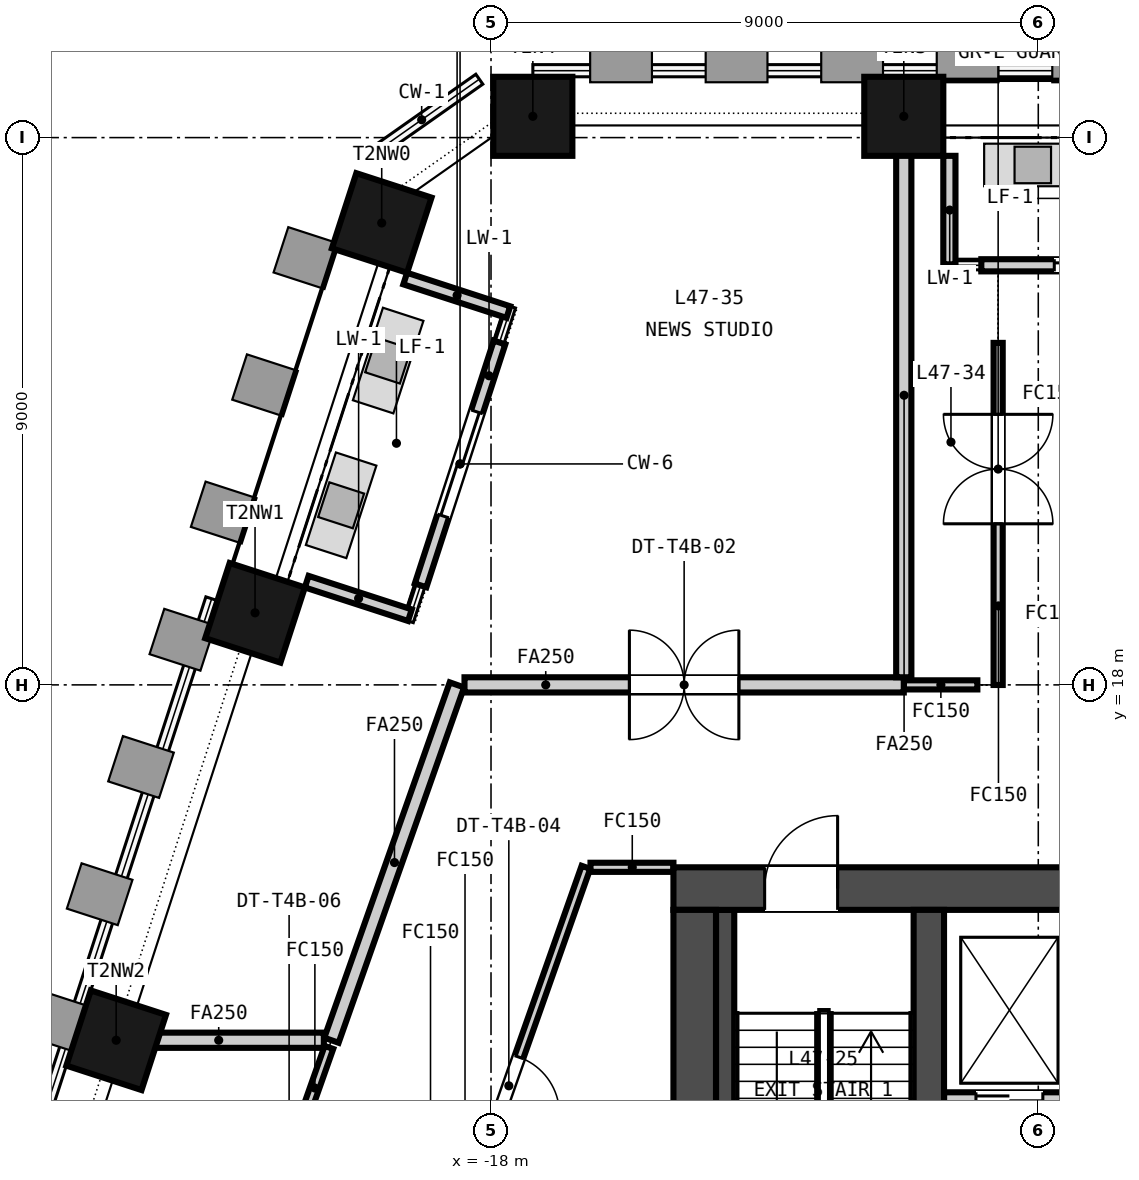
"""IFC4 building model, lengths in metres.
Left out: names, types, materials, properties, quantities, classifications, styles, units other than length and angle.
Written with IfcOpenShell. Run it as: python <this file> out.ifc"""

import sys

from ifc_helpers import new_model, si_unit, direction, frame, frame_2d, origin, origin_2d, place, context, subcontext, project, spatial, rectangle, extrude, element, fill, save


model = new_model("IFC4")
c1 = context("Model", 3, precision=1e-05, world=origin(), true_north=direction((0.0, 1.0)))
c2 = subcontext(c1, "Body", "Model", "MODEL_VIEW")
j1 = project(units=[si_unit("LENGTHUNIT", "METRE"), si_unit("PLANEANGLEUNIT", "RADIAN")], contexts=[c1])
p1 = place(None, origin())
s1 = spatial("IfcSite", under=j1, at=p1, CompositionType="ELEMENT")
p2 = place(p1, origin())
s2 = spatial("IfcBuilding", under=s1, at=p2, CompositionType="ELEMENT")
p3 = place(p2, frame((0.0, 0.0, 189.05)))
s3 = spatial("IfcBuildingStorey", under=s2, at=p3, CompositionType="ELEMENT", Elevation=189.05)
p4 = place(p3, frame((-15.0, 14.65, -0.15), z_axis=(0.0, 0.0, 1.0), x_axis=(1.0, 0.0, 0.0)))
e1 = element("IfcWall", 1, at=p4, inside=s3, PredefinedType="SOLIDWALL", context=c2, shape_type="SweptSolid", body=[
    extrude(rectangle(XDim=30.0, YDim=0.7, at=frame_2d((15.0, 0.0))), origin(), (0.0, 0.0, 1.0), 3.65),
])
p5 = place(p4, frame((9.25, 0.0, 0.15)))
e2 = element("IfcOpeningElement", 2, at=p5, cuts=e1, PredefinedType="OPENING", context=c2, shape_type="SweptSolid", body=[
    extrude(rectangle(XDim=1.5, YDim=2.1, at=frame_2d((0.75, 1.05))), frame((0.0, 0.36, 0.0), z_axis=(0.0, -1.0, 0.0), x_axis=(1.0, 0.0, 0.0)), (0.0, 0.0, 1.0), 0.72),
])
p6 = place(p4, frame((19.4, 0.0, 0.15)))
e3 = element("IfcOpeningElement", 3, at=p6, cuts=e1, PredefinedType="OPENING", context=c2, shape_type="SweptSolid", body=[
    extrude(rectangle(XDim=1.5, YDim=2.1, at=frame_2d((0.75, 1.05))), frame((0.0, 0.36, 0.0), z_axis=(0.0, -1.0, 0.0), x_axis=(1.0, 0.0, 0.0)), (0.0, 0.0, 1.0), 0.72),
])
p7 = place(p4, frame((1.5, 0.0, 0.15)))
e4 = element("IfcOpeningElement", 4, at=p7, cuts=e1, PredefinedType="OPENING", context=c2, shape_type="SweptSolid", body=[
    extrude(rectangle(XDim=1.2, YDim=2.1, at=frame_2d((0.6, 1.05))), frame((0.0, 0.36, 0.0), z_axis=(0.0, -1.0, 0.0), x_axis=(1.0, 0.0, 0.0)), (0.0, 0.0, 1.0), 0.72),
])
p8 = place(p4, frame((27.3, 0.0, 0.15)))
e5 = element("IfcOpeningElement", 5, at=p8, cuts=e1, PredefinedType="OPENING", context=c2, shape_type="SweptSolid", body=[
    extrude(rectangle(XDim=1.2, YDim=2.1, at=frame_2d((0.6, 1.05))), frame((0.0, 0.36, 0.0), z_axis=(0.0, -1.0, 0.0), x_axis=(1.0, 0.0, 0.0)), (0.0, 0.0, 1.0), 0.72),
])
p9 = place(p3, frame((-14.65, 0.7, -0.15), z_axis=(0.0, 0.0, 1.0), x_axis=(0.0, 1.0, 0.0)))
e6 = element("IfcWall", 6, at=p9, inside=s3, PredefinedType="SOLIDWALL", context=c2, shape_type="SweptSolid", body=[
    extrude(rectangle(XDim=13.6, YDim=0.7, at=frame_2d((6.8, 0.0))), origin(), (0.0, 0.0, 1.0), 3.65),
])
p10 = place(p3, frame((-10.8, 0.7, -0.15), z_axis=(0.0, 0.0, 1.0), x_axis=(0.0, 1.0, 0.0)))
e7 = element("IfcWall", 7, at=p10, inside=s3, PredefinedType="SOLIDWALL", context=c2, shape_type="SweptSolid", body=[
    extrude(rectangle(XDim=13.6, YDim=0.5, at=frame_2d((6.8, 0.0))), origin(), (0.0, 0.0, 1.0), 3.65),
])
for number, where, z_axis, x_axis in (
    (8, (-11.212, 27.35, -0.15), (0.0, 0.0, 1.0), (-1.0, 0.0, 0.0)),
    (9, (-17.312, 27.35, -0.15), (0.0, 0.0, 1.0), (-1.0, 0.0, 0.0)),
    (10, (-19.798, 25.596, -0.15), (0.0, 0.0, 1.0), (-0.309, -0.951, 0.0)),
    (11, (-21.881, 19.185, -0.15), (0.0, 0.0, 1.0), (-0.309, -0.951, 0.0)),
    (12, (-24.164, 12.156, -0.15), (0.0, 0.0, 1.0), (-0.309, -0.951, 0.0)),
):
    element("IfcColumn", number, at=place(p3, frame(where, z_axis=z_axis, x_axis=x_axis)), inside=s3, PredefinedType="COLUMN", context=c2, shape_type="SweptSolid", body=[
        extrude(rectangle(XDim=1.3, YDim=1.3, at=origin_2d()), origin(), (0.0, 0.0, 1.0), 3.65),
    ])
p11 = place(p3, frame((-5.737, 24.9, 0.0), z_axis=(0.0, 0.0, 1.0), x_axis=(-1.0, 0.0, 0.0)))
e13 = element("IfcWall", 13, at=p11, inside=s3, PredefinedType="SOLIDWALL", context=c2, shape_type="SweptSolid", body=[
    extrude(rectangle(XDim=4.2, YDim=0.2, at=frame_2d((2.1, 0.0))), origin(), (0.0, 0.0, 1.0), 2.751),
])
p12 = place(p11, frame((1.2, 0.0, 0.0)))
e14 = element("IfcOpeningElement", 14, at=p12, cuts=e13, PredefinedType="OPENING", context=c2, shape_type="SweptSolid", body=[
    extrude(rectangle(XDim=1.8, YDim=2.4, at=frame_2d((0.9, 1.2))), frame((0.0, 0.11, 0.0), z_axis=(0.0, -1.0, 0.0), x_axis=(1.0, 0.0, 0.0)), (0.0, 0.0, 1.0), 0.22),
])
p13 = place(p3, frame((-10.462, 26.7, 0.0), z_axis=(0.0, 0.0, 1.0), x_axis=(0.0, -1.0, 0.0)))
e15 = element("IfcWall", 15, at=p13, inside=s3, PredefinedType="SOLIDWALL", context=c2, shape_type="SweptSolid", body=[
    extrude(rectangle(XDim=1.784, YDim=0.2, at=frame_2d((0.892, 0.0))), origin(), (0.0, 0.0, 1.0), 3.05),
])
p14 = place(p3, frame((-17.86, 23.631, 0.0), z_axis=(0.0, 0.0, 1.0), x_axis=(-0.30901640812, -0.951056706781, 0.0)))
e16 = element("IfcWall", 16, at=p14, inside=s3, PredefinedType="SOLIDWALL", context=c2, shape_type="SweptSolid", body=[
    extrude(rectangle(XDim=4.2, YDim=0.2, at=frame_2d((2.1, 0.0))), origin(), (0.0, 0.0, 1.0), 3.05),
])
p15 = place(p14, frame((1.2, 0.0, 0.0)))
e17 = element("IfcOpeningElement", 17, at=p15, cuts=e16, PredefinedType="OPENING", context=c2, shape_type="SweptSolid", body=[
    extrude(rectangle(XDim=1.8, YDim=2.4, at=frame_2d((0.9, 1.2))), frame((0.0, 0.11, 0.0), z_axis=(0.0, -1.0, 0.0), x_axis=(1.0, 0.0, 0.0)), (0.0, 0.0, 1.0), 0.22),
])
p16 = place(p3, frame((-19.411, 24.682, 0.0), z_axis=(0.0, 0.0, 1.0), x_axis=(0.951064233263, -0.30899324298, 0.0)))
e18 = element("IfcWall", 18, at=p16, inside=s3, PredefinedType="SOLIDWALL", context=c2, shape_type="SweptSolid", body=[
    extrude(rectangle(XDim=1.784, YDim=0.2, at=frame_2d((0.892, 0.0))), origin(), (0.0, 0.0, 1.0), 3.05),
])
p17 = place(p3, frame((-21.031, 19.698, 0.0), z_axis=(0.0, 0.0, 1.0), x_axis=(0.951051165303, -0.309033462549, 0.0)))
e19 = element("IfcWall", 19, at=p17, inside=s3, PredefinedType="SOLIDWALL", context=c2, shape_type="SweptSolid", body=[
    extrude(rectangle(XDim=1.784, YDim=0.2, at=frame_2d((0.892, 0.0))), origin(), (0.0, 0.0, 1.0), 2.897),
])
p18 = place(p3, frame((-10.55, 11.2, 0.0), z_axis=(0.0, 0.0, 1.0), x_axis=(1.0, 0.0, 0.0)))
e20 = element("IfcWall", 20, at=p18, inside=s3, PredefinedType="PARTITIONING", context=c2, shape_type="SweptSolid", body=[
    extrude(rectangle(XDim=4.8, YDim=0.2, at=frame_2d((2.4, 0.0))), origin(), (0.0, 0.0, 1.0), 3.5),
])
p19 = place(p18, frame((0.525, 0.0, 0.0)))
e21 = element("IfcOpeningElement", 21, at=p19, cuts=e20, PredefinedType="OPENING", context=c2, shape_type="SweptSolid", body=[
    extrude(rectangle(XDim=1.1, YDim=2.1, at=frame_2d((0.55, 1.05))), frame((0.0, 0.11, 0.0), z_axis=(0.0, -1.0, 0.0), x_axis=(1.0, 0.0, 0.0)), (0.0, 0.0, 1.0), 0.22),
])
p20 = place(p18, frame((2.925, 0.0, 0.0)))
e22 = element("IfcOpeningElement", 22, at=p20, cuts=e20, PredefinedType="OPENING", context=c2, shape_type="SweptSolid", body=[
    extrude(rectangle(XDim=1.1, YDim=2.1, at=frame_2d((0.55, 1.05))), frame((0.0, 0.11, 0.0), z_axis=(0.0, -1.0, 0.0), x_axis=(1.0, 0.0, 0.0)), (0.0, 0.0, 1.0), 0.22),
])
p21 = place(p3, frame((-14.15, 0.7, 0.0), z_axis=(0.0, 0.0, 1.0), x_axis=(0.0, 1.0, 0.0)))
e23 = element("IfcWall", 23, at=p21, inside=s3, PredefinedType="SOLIDWALL", context=c2, shape_type="SweptSolid", body=[
    extrude(rectangle(XDim=13.6, YDim=0.3, at=frame_2d((6.8, 0.0))), origin(), (0.0, 0.0, 1.0), 3.5),
])
p22 = place(p3, frame((-16.439, 15.0, 0.0), z_axis=(0.0, 0.0, 1.0), x_axis=(-0.332796656951, -0.942998613531, 0.0)))
e24 = element("IfcWall", 24, at=p22, inside=s3, PredefinedType="PARTITIONING", context=c2, shape_type="SweptSolid", body=[
    extrude(rectangle(XDim=7.621, YDim=0.15, at=frame_2d((3.81, 0.0))), origin(), (0.0, 0.0, 1.0), 2.741),
])
p23 = place(p22, frame((3.31, 0.0, 0.0)))
e25 = element("IfcOpeningElement", 25, at=p23, cuts=e24, PredefinedType="OPENING", context=c2, shape_type="SweptSolid", body=[
    extrude(rectangle(XDim=1.0, YDim=2.1, at=frame_2d((0.5, 1.05))), frame((0.0, 0.085, 0.0), z_axis=(0.0, -1.0, 0.0), x_axis=(1.0, 0.0, 0.0)), (0.0, 0.0, 1.0), 0.17),
])
p24 = place(p3, frame((-15.0, 15.0, 0.0), z_axis=(0.0, 0.0, 1.0), x_axis=(-1.0, 0.0, 0.0)))
e26 = element("IfcWall", 26, at=p24, inside=s3, PredefinedType="PARTITIONING", context=c2, shape_type="SweptSolid", body=[
    extrude(rectangle(XDim=1.364, YDim=0.15, at=frame_2d((0.682, 0.0))), origin(), (0.0, 0.0, 1.0), 2.741),
])
p25 = place(p3, frame((-11.212, 18.0, 0.0), z_axis=(0.0, 0.0, 1.0), x_axis=(1.0, 0.0, 0.0)))
e27 = element("IfcWall", 27, at=p25, inside=s3, PredefinedType="PARTITIONING", context=c2, shape_type="SweptSolid", body=[
    extrude(rectangle(XDim=1.21, YDim=0.15, at=frame_2d((0.605, 0.0))), origin(), (0.0, 0.0, 1.0), 2.741),
])
p26 = place(p3, frame((-9.66, 17.998, 0.0), z_axis=(0.0, 0.0, 1.0), x_axis=(0.0, 1.0, 0.0)))
e28 = element("IfcWall", 28, at=p26, inside=s3, PredefinedType="PARTITIONING", context=c2, shape_type="SweptSolid", body=[
    extrude(rectangle(XDim=5.626, YDim=0.15, at=frame_2d((2.813, 0.0))), origin(), (0.0, 0.0, 1.0), 2.741),
])
p27 = place(p26, frame((2.651, 0.0, 0.0)))
e29 = element("IfcOpeningElement", 29, at=p27, cuts=e28, PredefinedType="OPENING", context=c2, shape_type="SweptSolid", body=[
    extrude(rectangle(XDim=1.8, YDim=2.1, at=frame_2d((0.9, 1.05))), frame((0.0, 0.085, 0.0), z_axis=(0.0, -1.0, 0.0), x_axis=(1.0, 0.0, 0.0)), (0.0, 0.0, 1.0), 0.17),
])
p28 = place(p3, frame((-20.624, 12.156, 0.0), z_axis=(0.0, 0.0, 1.0), x_axis=(0.332877813913, 0.942969968241, 0.0)))
e30 = element("IfcWall", 30, at=p28, inside=s3, PredefinedType="PARTITIONING", context=c2, shape_type="SweptSolid", body=[
    extrude(rectangle(XDim=6.198, YDim=0.25, at=frame_2d((3.099, 0.0))), origin(), (0.0, 0.0, 1.0), 2.741),
])
p29 = place(p3, frame((-18.436, 18.0, 0.0), z_axis=(0.0, 0.0, 1.0), x_axis=(1.0, 0.0, 0.0)))
e31 = element("IfcWall", 31, at=p29, inside=s3, PredefinedType="PARTITIONING", context=c2, shape_type="SweptSolid", body=[
    extrude(rectangle(XDim=7.224, YDim=0.25, at=frame_2d((3.612, 0.0))), origin(), (0.0, 0.0, 1.0), 2.741),
])
p30 = place(p29, frame((2.712, 0.0, 0.0)))
e32 = element("IfcOpeningElement", 32, at=p30, cuts=e31, PredefinedType="OPENING", context=c2, shape_type="SweptSolid", body=[
    extrude(rectangle(XDim=1.8, YDim=2.1, at=frame_2d((0.9, 1.05))), frame((0.0, 0.135, 0.0), z_axis=(0.0, -1.0, 0.0), x_axis=(1.0, 0.0, 0.0)), (0.0, 0.0, 1.0), 0.27),
])
p31 = place(p3, frame((-11.212, 18.125, 0.0), z_axis=(0.0, 0.0, 1.0), x_axis=(0.0, 1.0, 0.0)))
e33 = element("IfcWall", 33, at=p31, inside=s3, PredefinedType="PARTITIONING", context=c2, shape_type="SweptSolid", body=[
    extrude(rectangle(XDim=9.275, YDim=0.25, at=frame_2d((4.637, 0.0))), origin(), (0.0, 0.0, 1.0), 2.741),
])
p32 = place(p3, frame((-24.217, 12.156, 0.0), z_axis=(0.0, 0.0, 1.0), x_axis=(1.0, 0.0, 0.0)))
e34 = element("IfcWall", 34, at=p32, inside=s3, PredefinedType="PARTITIONING", context=c2, shape_type="SweptSolid", body=[
    extrude(rectangle(XDim=3.468, YDim=0.25, at=frame_2d((1.734, 0.0))), origin(), (0.0, 0.0, 1.0), 2.741),
])
p33 = place(p3, frame((-21.975, 8.328, 0.0), z_axis=(0.0, 0.0, 1.0), x_axis=(0.332820117735, 0.942990333583, 0.0)))
e35 = element("IfcWall", 35, at=p33, inside=s3, PredefinedType="PARTITIONING", context=c2, shape_type="SweptSolid", body=[
    extrude(rectangle(XDim=3.935, YDim=0.15, at=frame_2d((1.967, 0.0))), origin(), (0.0, 0.0, 1.0), 2.741),
])
p34 = place(p33, frame((1.467, 0.0, 0.0)))
e36 = element("IfcOpeningElement", 36, at=p34, cuts=e35, PredefinedType="OPENING", context=c2, shape_type="SweptSolid", body=[
    extrude(rectangle(XDim=1.0, YDim=2.1, at=frame_2d((0.5, 1.05))), frame((0.0, 0.085, 0.0), z_axis=(0.0, -1.0, 0.0), x_axis=(1.0, 0.0, 0.0)), (0.0, 0.0, 1.0), 0.17),
])
p35 = place(p12, origin())
e37 = element("IfcDoor", 37, at=p35, inside=s3, OperationType="SINGLE_SWING_LEFT", PredefinedType="DOOR", context=c2, shape_type="SweptSolid", body=[
    extrude(rectangle(XDim=1.8, YDim=2.4, at=frame_2d((0.9, 1.2))), frame((0.0, 0.025, 0.0), z_axis=(0.0, -1.0, 0.0), x_axis=(1.0, 0.0, 0.0)), (0.0, 0.0, 1.0), 0.05),
])
fill(e14, e37)
p36 = place(p15, origin())
e38 = element("IfcDoor", 38, at=p36, inside=s3, OperationType="SINGLE_SWING_LEFT", PredefinedType="DOOR", context=c2, shape_type="SweptSolid", body=[
    extrude(rectangle(XDim=1.8, YDim=2.4, at=frame_2d((0.9, 1.2))), frame((0.0, 0.025, 0.0), z_axis=(0.0, -1.0, 0.0), x_axis=(1.0, 0.0, 0.0)), (0.0, 0.0, 1.0), 0.05),
])
fill(e17, e38)
p37 = place(p19, origin())
e39 = element("IfcDoor", 39, at=p37, inside=s3, OperationType="DOUBLE_DOOR_SLIDING", PredefinedType="DOOR", context=c2, shape_type="SweptSolid", body=[
    extrude(rectangle(XDim=1.1, YDim=2.1, at=frame_2d((0.55, 1.05))), frame((0.0, 0.025, 0.0), z_axis=(0.0, -1.0, 0.0), x_axis=(1.0, 0.0, 0.0)), (0.0, 0.0, 1.0), 0.05),
])
fill(e21, e39)
p38 = place(p7, origin())
e40 = element("IfcDoor", 40, at=p38, inside=s3, OperationType="SINGLE_SWING_RIGHT", PredefinedType="DOOR", context=c2, shape_type="SweptSolid", body=[
    extrude(rectangle(XDim=1.2, YDim=2.1, at=frame_2d((0.6, 1.05))), frame((0.0, 0.025, 0.0), z_axis=(0.0, -1.0, 0.0), x_axis=(1.0, 0.0, 0.0)), (0.0, 0.0, 1.0), 0.05),
])
fill(e4, e40)
p39 = place(p27, origin())
e41 = element("IfcDoor", 41, at=p39, inside=s3, OperationType="DOUBLE_DOOR_DOUBLE_SWING", PredefinedType="DOOR", context=c2, shape_type="SweptSolid", body=[
    extrude(rectangle(XDim=1.8, YDim=2.1, at=frame_2d((0.9, 1.05))), frame((0.0, 0.025, 0.0), z_axis=(0.0, -1.0, 0.0), x_axis=(1.0, 0.0, 0.0)), (0.0, 0.0, 1.0), 0.05),
])
fill(e29, e41)
p40 = place(p30, origin())
e42 = element("IfcDoor", 42, at=p40, inside=s3, OperationType="DOUBLE_DOOR_DOUBLE_SWING", PredefinedType="DOOR", context=c2, shape_type="SweptSolid", body=[
    extrude(rectangle(XDim=1.8, YDim=2.1, at=frame_2d((0.9, 1.05))), frame((0.0, 0.025, 0.0), z_axis=(0.0, -1.0, 0.0), x_axis=(1.0, 0.0, 0.0)), (0.0, 0.0, 1.0), 0.05),
])
fill(e32, e42)
p41 = place(p23, origin())
e43 = element("IfcDoor", 43, at=p41, inside=s3, OperationType="SINGLE_SWING_RIGHT", PredefinedType="DOOR", context=c2, shape_type="SweptSolid", body=[
    extrude(rectangle(XDim=1.0, YDim=2.1, at=frame_2d((0.5, 1.05))), frame((0.0, 0.025, 0.0), z_axis=(0.0, -1.0, 0.0), x_axis=(1.0, 0.0, 0.0)), (0.0, 0.0, 1.0), 0.05),
])
fill(e25, e43)
save(model, sys.argv[1])
